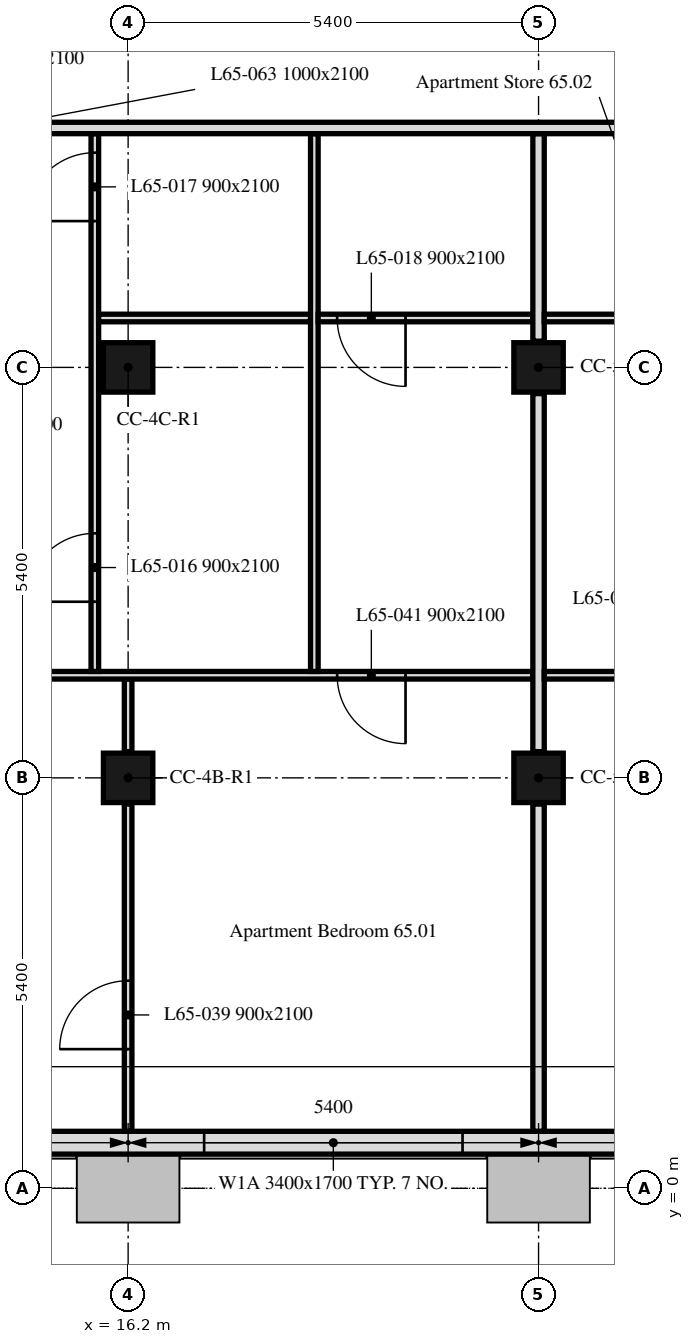
"""IFC4 building model, lengths in metres.
Left out: names, types, materials, properties, quantities, classifications, styles, units other than length and angle.
Written with IfcOpenShell. Run it as: python <this file> out.ifc"""

import sys

from ifc_helpers import new_model, si_unit, direction, frame, frame_2d, origin, origin_2d, place, context, subcontext, project, spatial, rectangle, extrude, element, fill, save


model = new_model("IFC4")
c1 = context("Model", 3, precision=1e-05, world=origin(), true_north=direction((0.0, 1.0)))
c2 = subcontext(c1, "Body", "Model", "MODEL_VIEW")
j1 = project(units=[si_unit("LENGTHUNIT", "METRE"), si_unit("PLANEANGLEUNIT", "RADIAN")], contexts=[c1])
p1 = place(None, origin())
s1 = spatial("IfcSite", under=j1, at=p1, CompositionType="ELEMENT")
p2 = place(p1, origin())
s2 = spatial("IfcBuilding", under=s1, at=p2, CompositionType="ELEMENT")
p3 = place(p2, frame((0.0, 0.0, 268.6)))
s3 = spatial("IfcBuildingStorey", under=s2, at=p3, CompositionType="ELEMENT", Elevation=268.6)
for number, where, z_axis, x_axis in (
    (1, (16.2, 5.4, 0.0), (0.0, 0.0, 1.0), (1.0, 0.0, 0.0)),
    (2, (21.6, 5.4, 0.0), (0.0, 0.0, 1.0), (1.0, 0.0, 0.0)),
    (3, (16.2, 10.8, 0.0), (0.0, 0.0, 1.0), (1.0, 0.0, 0.0)),
    (4, (21.6, 10.8, 0.0), (0.0, 0.0, 1.0), (1.0, 0.0, 0.0)),
):
    element("IfcColumn", number, at=place(p3, frame(where, z_axis=z_axis, x_axis=x_axis)), inside=s3, PredefinedType="COLUMN", context=c2, shape_type="SweptSolid", body=[
        extrude(rectangle(XDim=0.65, YDim=0.65, at=origin_2d()), origin(), (0.0, 0.0, 1.0), 3.0),
    ])
p4 = place(p3, frame((10.986, 0.6, 0.0), z_axis=(0.0, 0.0, 1.0), x_axis=(1.0, 0.0, 0.0)))
e5 = element("IfcWall", 5, at=p4, inside=s3, PredefinedType="SOLIDWALL", context=c2, shape_type="SweptSolid", body=[
    extrude(rectangle(XDim=32.027, YDim=0.3, at=frame_2d((16.014, 0.0))), origin(), (0.0, 0.0, 1.0), 3.0),
])
p5 = place(p4, frame((2.764, 0.0, 0.9)))
e6 = element("IfcOpeningElement", 6, at=p5, cuts=e5, PredefinedType="OPENING", context=c2, shape_type="SweptSolid", body=[
    extrude(rectangle(XDim=1.1, YDim=1.7, at=frame_2d((0.55, 0.85))), frame((0.0, 0.16, 0.0), z_axis=(0.0, -1.0, 0.0), x_axis=(1.0, 0.0, 0.0)), (0.0, 0.0, 1.0), 0.32),
])
p6 = place(p4, frame((6.214, 0.0, 0.9)))
e7 = element("IfcOpeningElement", 7, at=p6, cuts=e5, PredefinedType="OPENING", context=c2, shape_type="SweptSolid", body=[
    extrude(rectangle(XDim=3.4, YDim=1.7, at=frame_2d((1.7, 0.85))), frame((0.0, 0.16, 0.0), z_axis=(0.0, -1.0, 0.0), x_axis=(1.0, 0.0, 0.0)), (0.0, 0.0, 1.0), 0.32),
])
p7 = place(p4, frame((13.564, 0.0, 0.9)))
e8 = element("IfcOpeningElement", 8, at=p7, cuts=e5, PredefinedType="OPENING", context=c2, shape_type="SweptSolid", body=[
    extrude(rectangle(XDim=1.1, YDim=1.7, at=frame_2d((0.55, 0.85))), frame((0.0, 0.16, 0.0), z_axis=(0.0, -1.0, 0.0), x_axis=(1.0, 0.0, 0.0)), (0.0, 0.0, 1.0), 0.32),
])
p8 = place(p4, frame((17.014, 0.0, 0.9)))
e9 = element("IfcOpeningElement", 9, at=p8, cuts=e5, PredefinedType="OPENING", context=c2, shape_type="SweptSolid", body=[
    extrude(rectangle(XDim=3.4, YDim=1.7, at=frame_2d((1.7, 0.85))), frame((0.0, 0.16, 0.0), z_axis=(0.0, -1.0, 0.0), x_axis=(1.0, 0.0, 0.0)), (0.0, 0.0, 1.0), 0.32),
])
p9 = place(p4, frame((24.364, 0.0, 0.9)))
e10 = element("IfcOpeningElement", 10, at=p9, cuts=e5, PredefinedType="OPENING", context=c2, shape_type="SweptSolid", body=[
    extrude(rectangle(XDim=1.1, YDim=1.7, at=frame_2d((0.55, 0.85))), frame((0.0, 0.16, 0.0), z_axis=(0.0, -1.0, 0.0), x_axis=(1.0, 0.0, 0.0)), (0.0, 0.0, 1.0), 0.32),
])
p10 = place(p4, frame((27.814, 0.0, 0.9)))
e11 = element("IfcOpeningElement", 11, at=p10, cuts=e5, PredefinedType="OPENING", context=c2, shape_type="SweptSolid", body=[
    extrude(rectangle(XDim=3.4, YDim=1.7, at=frame_2d((1.7, 0.85))), frame((0.0, 0.16, 0.0), z_axis=(0.0, -1.0, 0.0), x_axis=(1.0, 0.0, 0.0)), (0.0, 0.0, 1.0), 0.32),
])
p11 = place(p3, frame((16.2, 0.751, 0.0), z_axis=(0.0, 0.0, 1.0), x_axis=(0.0, 1.0, 0.0)))
e12 = element("IfcWall", 12, at=p11, inside=s3, PredefinedType="PARTITIONING", context=c2, shape_type="SweptSolid", body=[
    extrude(rectangle(XDim=4.304, YDim=0.1, at=frame_2d((2.152, 0.0))), origin(), (0.0, 0.0, 1.0), 2.4),
])
p12 = place(p11, frame((1.08, 0.0, 0.0)))
e13 = element("IfcOpeningElement", 13, at=p12, cuts=e12, PredefinedType="OPENING", context=c2, shape_type="SweptSolid", body=[
    extrude(rectangle(XDim=0.9, YDim=2.1, at=frame_2d((0.45, 1.05))), frame((0.0, 0.05, 0.0), z_axis=(0.0, -1.0, 0.0), x_axis=(1.0, 0.0, 0.0)), (0.0, 0.0, 1.0), 0.1),
])
p13 = place(p3, frame((16.2, 5.745, 0.0), z_axis=(0.0, 0.0, 1.0), x_axis=(0.0, 1.0, 0.0)))
e14 = element("IfcWall", 14, at=p13, inside=s3, PredefinedType="PARTITIONING", context=c2, shape_type="SweptSolid", body=[
    extrude(rectangle(XDim=0.955, YDim=0.1, at=frame_2d((0.478, 0.0))), origin(), (0.0, 0.0, 1.0), 2.4),
])
p14 = place(p3, frame((21.525, 6.75, 0.0), z_axis=(0.0, 0.0, 1.0), x_axis=(-1.0, 0.0, 0.0)))
e15 = element("IfcWall", 15, at=p14, inside=s3, PredefinedType="PARTITIONING", context=c2, shape_type="SweptSolid", body=[
    extrude(rectangle(XDim=10.65, YDim=0.1, at=frame_2d((5.325, 0.0))), origin(), (0.0, 0.0, 1.0), 2.4),
])
p15 = place(p14, frame((8.813, 0.0, 0.0)))
e16 = element("IfcOpeningElement", 16, at=p15, cuts=e15, PredefinedType="OPENING", context=c2, shape_type="SweptSolid", body=[
    extrude(rectangle(XDim=0.9, YDim=2.1, at=frame_2d((0.45, 1.05))), frame((0.0, 0.05, 0.0), z_axis=(0.0, -1.0, 0.0), x_axis=(1.0, 0.0, 0.0)), (0.0, 0.0, 1.0), 0.1),
])
p16 = place(p14, frame((1.675, 0.0, 0.0)))
e17 = element("IfcOpeningElement", 17, at=p16, cuts=e15, PredefinedType="OPENING", context=c2, shape_type="SweptSolid", body=[
    extrude(rectangle(XDim=0.9, YDim=2.1, at=frame_2d((0.45, 1.05))), frame((0.0, 0.05, 0.0), z_axis=(0.0, -1.0, 0.0), x_axis=(1.0, 0.0, 0.0)), (0.0, 0.0, 1.0), 0.1),
])
p17 = place(p14, frame((7.313, 0.0, 0.0)))
e18 = element("IfcOpeningElement", 18, at=p17, cuts=e15, PredefinedType="OPENING", context=c2, shape_type="SweptSolid", body=[
    extrude(rectangle(XDim=0.9, YDim=2.1, at=frame_2d((0.45, 1.05))), frame((0.0, 0.05, 0.0), z_axis=(0.0, -1.0, 0.0), x_axis=(1.0, 0.0, 0.0)), (0.0, 0.0, 1.0), 0.1),
])
p18 = place(p3, frame((21.6, 0.751, 0.0), z_axis=(0.0, 0.0, 1.0), x_axis=(0.0, 1.0, 0.0)))
e19 = element("IfcWall", 19, at=p18, inside=s3, PredefinedType="PARTITIONING", context=c2, shape_type="SweptSolid", body=[
    extrude(rectangle(XDim=4.304, YDim=0.15, at=frame_2d((2.152, 0.0))), origin(), (0.0, 0.0, 1.0), 2.4),
])
p19 = place(p3, frame((15.762, 6.8, 0.0), z_axis=(0.0, 0.0, 1.0), x_axis=(0.0, 1.0, 0.0)))
e20 = element("IfcWall", 20, at=p19, inside=s3, PredefinedType="PARTITIONING", context=c2, shape_type="SweptSolid", body=[
    extrude(rectangle(XDim=7.075, YDim=0.1, at=frame_2d((3.538, 0.0))), origin(), (0.0, 0.0, 1.0), 3.0),
])
p20 = place(p19, frame((0.917, 0.0, 0.0)))
e21 = element("IfcOpeningElement", 21, at=p20, cuts=e20, PredefinedType="OPENING", context=c2, shape_type="SweptSolid", body=[
    extrude(rectangle(XDim=0.9, YDim=2.1, at=frame_2d((0.45, 1.05))), frame((0.0, 0.05, 0.0), z_axis=(0.0, -1.0, 0.0), x_axis=(1.0, 0.0, 0.0)), (0.0, 0.0, 1.0), 0.1),
])
p21 = place(p19, frame((5.925, 0.0, 0.0)))
e22 = element("IfcOpeningElement", 22, at=p21, cuts=e20, PredefinedType="OPENING", context=c2, shape_type="SweptSolid", body=[
    extrude(rectangle(XDim=0.9, YDim=2.1, at=frame_2d((0.45, 1.05))), frame((0.0, 0.05, 0.0), z_axis=(0.0, -1.0, 0.0), x_axis=(1.0, 0.0, 0.0)), (0.0, 0.0, 1.0), 0.1),
])
p22 = place(p3, frame((18.6, 11.45, 0.0), z_axis=(0.0, 0.0, 1.0), x_axis=(-1.0, 0.0, 0.0)))
e23 = element("IfcWall", 23, at=p22, inside=s3, PredefinedType="PARTITIONING", context=c2, shape_type="SweptSolid", body=[
    extrude(rectangle(XDim=2.788, YDim=0.1, at=frame_2d((1.394, 0.0))), origin(), (0.0, 0.0, 1.0), 2.4),
])
p23 = place(p3, frame((18.65, 6.8, 0.0), z_axis=(0.0, 0.0, 1.0), x_axis=(0.0, 1.0, 0.0)))
e24 = element("IfcWall", 24, at=p23, inside=s3, PredefinedType="PARTITIONING", context=c2, shape_type="SweptSolid", body=[
    extrude(rectangle(XDim=7.075, YDim=0.1, at=frame_2d((3.538, 0.0))), origin(), (0.0, 0.0, 1.0), 3.0),
])
p24 = place(p3, frame((21.6, 5.745, 0.0), z_axis=(0.0, 0.0, 1.0), x_axis=(0.0, 1.0, 0.0)))
e25 = element("IfcWall", 25, at=p24, inside=s3, PredefinedType="PARTITIONING", context=c2, shape_type="SweptSolid", body=[
    extrude(rectangle(XDim=4.71, YDim=0.15, at=frame_2d((2.355, 0.0))), origin(), (0.0, 0.0, 1.0), 2.4),
])
p25 = place(p3, frame((21.525, 11.45, 0.0), z_axis=(0.0, 0.0, 1.0), x_axis=(-1.0, 0.0, 0.0)))
e26 = element("IfcWall", 26, at=p25, inside=s3, PredefinedType="PARTITIONING", context=c2, shape_type="SweptSolid", body=[
    extrude(rectangle(XDim=2.825, YDim=0.1, at=frame_2d((1.413, 0.0))), origin(), (0.0, 0.0, 1.0), 3.0),
])
p26 = place(p25, frame((1.675, 0.0, 0.0)))
e27 = element("IfcOpeningElement", 27, at=p26, cuts=e26, PredefinedType="OPENING", context=c2, shape_type="SweptSolid", body=[
    extrude(rectangle(XDim=0.9, YDim=2.1, at=frame_2d((0.45, 1.05))), frame((0.0, 0.05, 0.0), z_axis=(0.0, -1.0, 0.0), x_axis=(1.0, 0.0, 0.0)), (0.0, 0.0, 1.0), 0.1),
])
p27 = place(p3, frame((21.6, 11.145, 0.0), z_axis=(0.0, 0.0, 1.0), x_axis=(0.0, 1.0, 0.0)))
e28 = element("IfcWall", 28, at=p27, inside=s3, PredefinedType="PARTITIONING", context=c2, shape_type="SweptSolid", body=[
    extrude(rectangle(XDim=2.73, YDim=0.15, at=frame_2d((1.365, 0.0))), origin(), (0.0, 0.0, 1.0), 2.4),
])
p28 = place(p3, frame((26.95, 6.75, 0.0), z_axis=(0.0, 0.0, 1.0), x_axis=(-1.0, 0.0, 0.0)))
e29 = element("IfcWall", 29, at=p28, inside=s3, PredefinedType="PARTITIONING", context=c2, shape_type="SweptSolid", body=[
    extrude(rectangle(XDim=5.275, YDim=0.1, at=frame_2d((2.637, 0.0))), origin(), (0.0, 0.0, 1.0), 3.0),
])
p29 = place(p28, frame((2.88, 0.0, 0.0)))
e30 = element("IfcOpeningElement", 30, at=p29, cuts=e29, PredefinedType="OPENING", context=c2, shape_type="SweptSolid", body=[
    extrude(rectangle(XDim=0.9, YDim=2.1, at=frame_2d((0.45, 1.05))), frame((0.0, 0.05, 0.0), z_axis=(0.0, -1.0, 0.0), x_axis=(1.0, 0.0, 0.0)), (0.0, 0.0, 1.0), 0.1),
])
p30 = place(p28, frame((1.38, 0.0, 0.0)))
e31 = element("IfcOpeningElement", 31, at=p30, cuts=e29, PredefinedType="OPENING", context=c2, shape_type="SweptSolid", body=[
    extrude(rectangle(XDim=0.9, YDim=2.1, at=frame_2d((0.45, 1.05))), frame((0.0, 0.05, 0.0), z_axis=(0.0, -1.0, 0.0), x_axis=(1.0, 0.0, 0.0)), (0.0, 0.0, 1.0), 0.1),
])
p31 = place(p3, frame((24.32, 11.45, 0.0), z_axis=(0.0, 0.0, 1.0), x_axis=(-1.0, 0.0, 0.0)))
e32 = element("IfcWall", 32, at=p31, inside=s3, PredefinedType="PARTITIONING", context=c2, shape_type="SweptSolid", body=[
    extrude(rectangle(XDim=2.645, YDim=0.1, at=frame_2d((1.323, 0.0))), origin(), (0.0, 0.0, 1.0), 3.0),
])
p32 = place(p3, frame((47.849, 13.95, 0.0), z_axis=(0.0, 0.0, 1.0), x_axis=(-1.0, 0.0, 0.0)))
e33 = element("IfcWall", 33, at=p32, inside=s3, PredefinedType="PARTITIONING", context=c2, shape_type="SweptSolid", body=[
    extrude(rectangle(XDim=41.698, YDim=0.15, at=frame_2d((20.849, 0.0))), origin(), (0.0, 0.0, 1.0), 2.4),
])
p33 = place(p32, frame((37.749, 0.0, 0.0)))
e34 = element("IfcOpeningElement", 34, at=p33, cuts=e33, PredefinedType="OPENING", context=c2, shape_type="SweptSolid", body=[
    extrude(rectangle(XDim=1.0, YDim=2.1, at=frame_2d((0.5, 1.05))), frame((0.0, 0.075, 0.0), z_axis=(0.0, -1.0, 0.0), x_axis=(1.0, 0.0, 0.0)), (0.0, 0.0, 1.0), 0.15),
])
p34 = place(p32, frame((32.962, 0.0, 0.0)))
e35 = element("IfcOpeningElement", 35, at=p34, cuts=e33, PredefinedType="OPENING", context=c2, shape_type="SweptSolid", body=[
    extrude(rectangle(XDim=1.0, YDim=2.1, at=frame_2d((0.5, 1.05))), frame((0.0, 0.075, 0.0), z_axis=(0.0, -1.0, 0.0), x_axis=(1.0, 0.0, 0.0)), (0.0, 0.0, 1.0), 0.15),
])
p35 = place(p32, frame((22.179, 0.0, 0.0)))
e36 = element("IfcOpeningElement", 36, at=p35, cuts=e33, PredefinedType="OPENING", context=c2, shape_type="SweptSolid", body=[
    extrude(rectangle(XDim=1.0, YDim=2.1, at=frame_2d((0.5, 1.05))), frame((0.0, 0.075, 0.0), z_axis=(0.0, -1.0, 0.0), x_axis=(1.0, 0.0, 0.0)), (0.0, 0.0, 1.0), 0.15),
])
p36 = place(p32, frame((9.193, 0.0, 0.0)))
e37 = element("IfcOpeningElement", 37, at=p36, cuts=e33, PredefinedType="OPENING", context=c2, shape_type="SweptSolid", body=[
    extrude(rectangle(XDim=1.0, YDim=2.1, at=frame_2d((0.5, 1.05))), frame((0.0, 0.075, 0.0), z_axis=(0.0, -1.0, 0.0), x_axis=(1.0, 0.0, 0.0)), (0.0, 0.0, 1.0), 0.15),
])
p37 = place(p6, origin())
e38 = element("IfcWindow", 38, at=p37, inside=s3, PartitioningType="SINGLE_PANEL", PredefinedType="WINDOW", context=c2, shape_type="SweptSolid", body=[
    extrude(rectangle(XDim=3.4, YDim=1.7, at=frame_2d((1.7, 0.85))), frame((0.0, 0.03, 0.0), z_axis=(0.0, -1.0, 0.0), x_axis=(1.0, 0.0, 0.0)), (0.0, 0.0, 1.0), 0.06),
])
fill(e7, e38)
p38 = place(p20, origin())
e39 = element("IfcDoor", 39, at=p38, inside=s3, OperationType="SINGLE_SWING_RIGHT", PredefinedType="DOOR", context=c2, shape_type="SweptSolid", body=[
    extrude(rectangle(XDim=0.9, YDim=2.1, at=frame_2d((0.45, 1.05))), frame((0.0, 0.025, 0.0), z_axis=(0.0, -1.0, 0.0), x_axis=(1.0, 0.0, 0.0)), (0.0, 0.0, 1.0), 0.05),
])
fill(e21, e39)
p39 = place(p21, origin())
e40 = element("IfcDoor", 40, at=p39, inside=s3, OperationType="SINGLE_SWING_RIGHT", PredefinedType="DOOR", context=c2, shape_type="SweptSolid", body=[
    extrude(rectangle(XDim=0.9, YDim=2.1, at=frame_2d((0.45, 1.05))), frame((0.0, 0.025, 0.0), z_axis=(0.0, -1.0, 0.0), x_axis=(1.0, 0.0, 0.0)), (0.0, 0.0, 1.0), 0.05),
])
fill(e22, e40)
p40 = place(p26, origin())
e41 = element("IfcDoor", 41, at=p40, inside=s3, OperationType="SINGLE_SWING_RIGHT", PredefinedType="DOOR", context=c2, shape_type="SweptSolid", body=[
    extrude(rectangle(XDim=0.9, YDim=2.1, at=frame_2d((0.45, 1.05))), frame((0.0, 0.025, 0.0), z_axis=(0.0, -1.0, 0.0), x_axis=(1.0, 0.0, 0.0)), (0.0, 0.0, 1.0), 0.05),
])
fill(e27, e41)
p41 = place(p12, origin())
e42 = element("IfcDoor", 42, at=p41, inside=s3, OperationType="SINGLE_SWING_RIGHT", PredefinedType="DOOR", context=c2, shape_type="SweptSolid", body=[
    extrude(rectangle(XDim=0.9, YDim=2.1, at=frame_2d((0.45, 1.05))), frame((0.0, 0.025, 0.0), z_axis=(0.0, -1.0, 0.0), x_axis=(1.0, 0.0, 0.0)), (0.0, 0.0, 1.0), 0.05),
])
fill(e13, e42)
p42 = place(p16, origin())
e43 = element("IfcDoor", 43, at=p42, inside=s3, OperationType="SINGLE_SWING_RIGHT", PredefinedType="DOOR", context=c2, shape_type="SweptSolid", body=[
    extrude(rectangle(XDim=0.9, YDim=2.1, at=frame_2d((0.45, 1.05))), frame((0.0, 0.025, 0.0), z_axis=(0.0, -1.0, 0.0), x_axis=(1.0, 0.0, 0.0)), (0.0, 0.0, 1.0), 0.05),
])
fill(e17, e43)
save(model, sys.argv[1])
